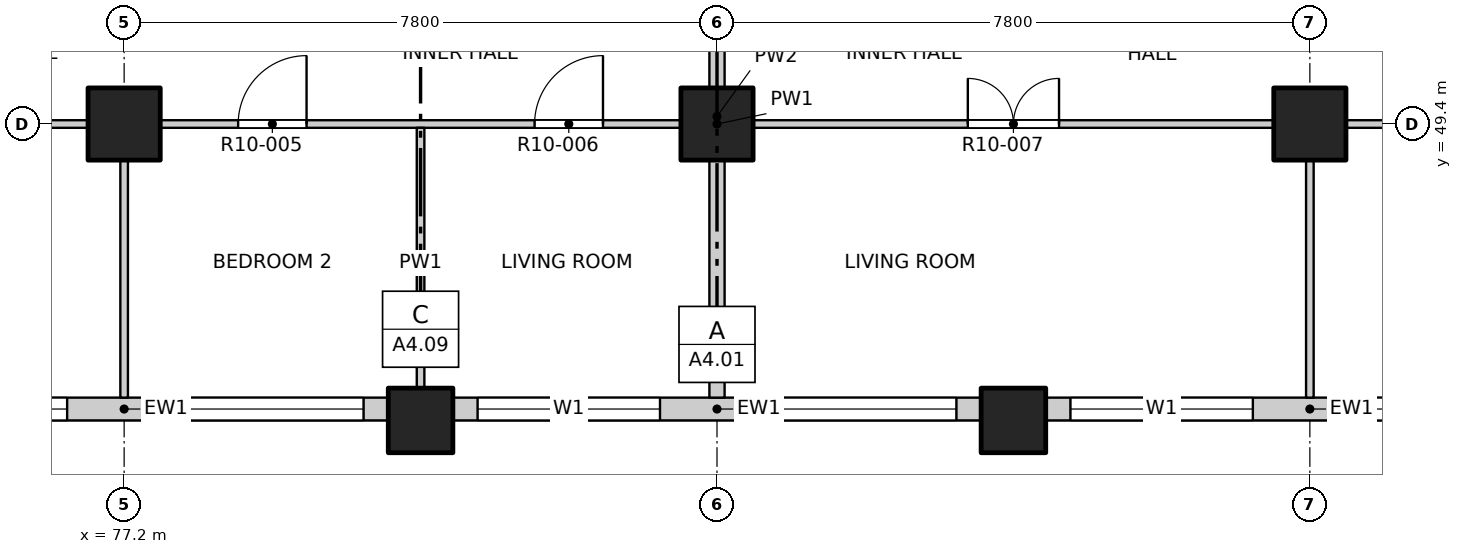
"""IFC4 building model, lengths in metres.
Left out: names, types, materials, properties, quantities, classifications, styles, units other than length and angle.
Written with IfcOpenShell. Run it as: python <this file> out.ifc"""

import sys

from ifc_helpers import new_model, si_unit, direction, frame, frame_2d, origin, origin_2d, place, context, subcontext, project, spatial, rectangle, extrude, element, fill, save


model = new_model("IFC4")
c1 = context("Model", 3, precision=1e-05, world=origin(), true_north=direction((0.0, 1.0)))
c2 = subcontext(c1, "Body", "Model", "MODEL_VIEW")
j1 = project(units=[si_unit("LENGTHUNIT", "METRE"), si_unit("PLANEANGLEUNIT", "RADIAN")], contexts=[c1])
p1 = place(None, origin())
s1 = spatial("IfcSite", under=j1, at=p1, CompositionType="ELEMENT")
p2 = place(p1, origin())
s2 = spatial("IfcBuilding", under=s1, at=p2, CompositionType="ELEMENT")
p3 = place(p2, frame((0.0, 0.0, 123.7)))
s3 = spatial("IfcBuildingStorey", under=s2, at=p3, CompositionType="ELEMENT", Elevation=123.7)
for number, where, z_axis, x_axis in (
    (1, (81.1, 45.5, -0.3), (0.0, 0.0, 1.0), (1.0, 0.0, 0.0)),
    (2, (88.9, 45.5, -0.3), (0.0, 0.0, 1.0), (1.0, 0.0, 0.0)),
):
    element("IfcColumn", number, at=place(p3, frame(where, z_axis=z_axis, x_axis=x_axis)), inside=s3, PredefinedType="COLUMN", context=c2, shape_type="SweptSolid", body=[
        extrude(rectangle(XDim=0.85, YDim=0.85, at=origin_2d()), origin(), (0.0, 0.0, 1.0), 3.45),
    ])
for number, where, z_axis, x_axis in (
    (3, (77.2, 49.4, -0.3), (0.0, 0.0, 1.0), (1.0, 0.0, 0.0)),
    (4, (85.0, 49.4, -0.3), (0.0, 0.0, 1.0), (1.0, 0.0, 0.0)),
    (5, (92.8, 49.4, -0.3), (0.0, 0.0, 1.0), (1.0, 0.0, 0.0)),
):
    element("IfcColumn", number, at=place(p3, frame(where, z_axis=z_axis, x_axis=x_axis)), inside=s3, PredefinedType="COLUMN", context=c2, shape_type="SweptSolid", body=[
        extrude(rectangle(XDim=0.95, YDim=0.95, at=origin_2d()), origin(), (0.0, 0.0, 1.0), 3.45),
    ])
p4 = place(p3, frame((73.725, 45.65, 0.0), z_axis=(0.0, 0.0, 1.0), x_axis=(1.0, 0.0, 0.0)))
e6 = element("IfcWall", 6, at=p4, inside=s3, PredefinedType="SOLIDWALL", context=c2, shape_type="SweptSolid", body=[
    extrude(rectangle(XDim=6.95, YDim=0.3, at=frame_2d((3.475, 0.0))), origin(), (0.0, 0.0, 1.0), 2.7),
])
p5 = place(p4, frame((0.325, 0.0, 0.9)))
e7 = element("IfcOpeningElement", 7, at=p5, cuts=e6, PredefinedType="OPENING", context=c2, shape_type="SweptSolid", body=[
    extrude(rectangle(XDim=2.4, YDim=1.8, at=frame_2d((1.2, 0.9))), frame((0.0, 0.16, 0.0), z_axis=(0.0, -1.0, 0.0), x_axis=(1.0, 0.0, 0.0)), (0.0, 0.0, 1.0), 0.32),
])
p6 = place(p4, frame((4.225, 0.0, 0.9)))
e8 = element("IfcOpeningElement", 8, at=p6, cuts=e6, PredefinedType="OPENING", context=c2, shape_type="SweptSolid", body=[
    extrude(rectangle(XDim=2.4, YDim=1.8, at=frame_2d((1.2, 0.9))), frame((0.0, 0.16, 0.0), z_axis=(0.0, -1.0, 0.0), x_axis=(1.0, 0.0, 0.0)), (0.0, 0.0, 1.0), 0.32),
])
p7 = place(p3, frame((81.525, 45.65, 0.0), z_axis=(0.0, 0.0, 1.0), x_axis=(1.0, 0.0, 0.0)))
e9 = element("IfcWall", 9, at=p7, inside=s3, PredefinedType="SOLIDWALL", context=c2, shape_type="SweptSolid", body=[
    extrude(rectangle(XDim=6.95, YDim=0.3, at=frame_2d((3.475, 0.0))), origin(), (0.0, 0.0, 1.0), 2.7),
])
p8 = place(p7, frame((0.325, 0.0, 0.9)))
e10 = element("IfcOpeningElement", 10, at=p8, cuts=e9, PredefinedType="OPENING", context=c2, shape_type="SweptSolid", body=[
    extrude(rectangle(XDim=2.4, YDim=1.8, at=frame_2d((1.2, 0.9))), frame((0.0, 0.16, 0.0), z_axis=(0.0, -1.0, 0.0), x_axis=(1.0, 0.0, 0.0)), (0.0, 0.0, 1.0), 0.32),
])
p9 = place(p7, frame((4.225, 0.0, 0.9)))
e11 = element("IfcOpeningElement", 11, at=p9, cuts=e9, PredefinedType="OPENING", context=c2, shape_type="SweptSolid", body=[
    extrude(rectangle(XDim=2.4, YDim=1.8, at=frame_2d((1.2, 0.9))), frame((0.0, 0.16, 0.0), z_axis=(0.0, -1.0, 0.0), x_axis=(1.0, 0.0, 0.0)), (0.0, 0.0, 1.0), 0.32),
])
p10 = place(p3, frame((89.325, 45.65, 0.0), z_axis=(0.0, 0.0, 1.0), x_axis=(1.0, 0.0, 0.0)))
e12 = element("IfcWall", 12, at=p10, inside=s3, PredefinedType="SOLIDWALL", context=c2, shape_type="SweptSolid", body=[
    extrude(rectangle(XDim=6.95, YDim=0.3, at=frame_2d((3.475, 0.0))), origin(), (0.0, 0.0, 1.0), 2.7),
])
p11 = place(p10, frame((0.325, 0.0, 0.9)))
e13 = element("IfcOpeningElement", 13, at=p11, cuts=e12, PredefinedType="OPENING", context=c2, shape_type="SweptSolid", body=[
    extrude(rectangle(XDim=2.4, YDim=1.8, at=frame_2d((1.2, 0.9))), frame((0.0, 0.16, 0.0), z_axis=(0.0, -1.0, 0.0), x_axis=(1.0, 0.0, 0.0)), (0.0, 0.0, 1.0), 0.32),
])
p12 = place(p10, frame((4.225, 0.0, 0.9)))
e14 = element("IfcOpeningElement", 14, at=p12, cuts=e12, PredefinedType="OPENING", context=c2, shape_type="SweptSolid", body=[
    extrude(rectangle(XDim=2.4, YDim=1.8, at=frame_2d((1.2, 0.9))), frame((0.0, 0.16, 0.0), z_axis=(0.0, -1.0, 0.0), x_axis=(1.0, 0.0, 0.0)), (0.0, 0.0, 1.0), 0.32),
])
p13 = place(p3, frame((65.8, 49.4, 0.0), z_axis=(0.0, 0.0, 1.0), x_axis=(1.0, 0.0, 0.0)))
e15 = element("IfcWall", 15, at=p13, inside=s3, PredefinedType="PARTITIONING", context=c2, shape_type="SweptSolid", body=[
    extrude(rectangle(XDim=38.4, YDim=0.1, at=frame_2d((19.2, 0.0))), origin(), (0.0, 0.0, 1.0), 3.15),
])
p14 = place(p13, frame((4.19, 0.0, 0.0)))
e16 = element("IfcOpeningElement", 16, at=p14, cuts=e15, PredefinedType="OPENING", context=c2, shape_type="SweptSolid", body=[
    extrude(rectangle(XDim=0.9, YDim=2.1, at=frame_2d((0.45, 1.05))), frame((0.0, 0.06, 0.0), z_axis=(0.0, -1.0, 0.0), x_axis=(1.0, 0.0, 0.0)), (0.0, 0.0, 1.0), 0.12),
])
p15 = place(p13, frame((9.0, 0.0, 0.0)))
e17 = element("IfcOpeningElement", 17, at=p15, cuts=e15, PredefinedType="OPENING", context=c2, shape_type="SweptSolid", body=[
    extrude(rectangle(XDim=0.9, YDim=2.1, at=frame_2d((0.45, 1.05))), frame((0.0, 0.06, 0.0), z_axis=(0.0, -1.0, 0.0), x_axis=(1.0, 0.0, 0.0)), (0.0, 0.0, 1.0), 0.12),
])
p16 = place(p13, frame((12.9, 0.0, 0.0)))
e18 = element("IfcOpeningElement", 18, at=p16, cuts=e15, PredefinedType="OPENING", context=c2, shape_type="SweptSolid", body=[
    extrude(rectangle(XDim=0.9, YDim=2.1, at=frame_2d((0.45, 1.05))), frame((0.0, 0.06, 0.0), z_axis=(0.0, -1.0, 0.0), x_axis=(1.0, 0.0, 0.0)), (0.0, 0.0, 1.0), 0.12),
])
p17 = place(p13, frame((16.8, 0.0, 0.0)))
e19 = element("IfcOpeningElement", 19, at=p17, cuts=e15, PredefinedType="OPENING", context=c2, shape_type="SweptSolid", body=[
    extrude(rectangle(XDim=0.9, YDim=2.1, at=frame_2d((0.45, 1.05))), frame((0.0, 0.06, 0.0), z_axis=(0.0, -1.0, 0.0), x_axis=(1.0, 0.0, 0.0)), (0.0, 0.0, 1.0), 0.12),
])
p18 = place(p13, frame((22.5, 0.0, 0.0)))
e20 = element("IfcOpeningElement", 20, at=p18, cuts=e15, PredefinedType="OPENING", context=c2, shape_type="SweptSolid", body=[
    extrude(rectangle(XDim=1.2, YDim=2.1, at=frame_2d((0.6, 1.05))), frame((0.0, 0.06, 0.0), z_axis=(0.0, -1.0, 0.0), x_axis=(1.0, 0.0, 0.0)), (0.0, 0.0, 1.0), 0.12),
])
p19 = place(p13, frame((28.5, 0.0, 0.0)))
e21 = element("IfcOpeningElement", 21, at=p19, cuts=e15, PredefinedType="OPENING", context=c2, shape_type="SweptSolid", body=[
    extrude(rectangle(XDim=0.9, YDim=2.1, at=frame_2d((0.45, 1.05))), frame((0.0, 0.06, 0.0), z_axis=(0.0, -1.0, 0.0), x_axis=(1.0, 0.0, 0.0)), (0.0, 0.0, 1.0), 0.12),
])
p20 = place(p13, frame((33.31, 0.0, 0.0)))
e22 = element("IfcOpeningElement", 22, at=p20, cuts=e15, PredefinedType="OPENING", context=c2, shape_type="SweptSolid", body=[
    extrude(rectangle(XDim=0.9, YDim=2.1, at=frame_2d((0.45, 1.05))), frame((0.0, 0.06, 0.0), z_axis=(0.0, -1.0, 0.0), x_axis=(1.0, 0.0, 0.0)), (0.0, 0.0, 1.0), 0.12),
])
for number, where, z_axis, x_axis in (
    (23, (77.2, 45.8, 0.0), (0.0, 0.0, 1.0), (0.0, 1.0, 0.0)),
    (24, (81.1, 45.8, 0.0), (0.0, 0.0, 1.0), (0.0, 1.0, 0.0)),
):
    element("IfcWall", number, at=place(p3, frame(where, z_axis=z_axis, x_axis=x_axis)), inside=s3, PredefinedType="PARTITIONING", context=c2, shape_type="SweptSolid", body=[
        extrude(rectangle(XDim=3.55, YDim=0.1, at=frame_2d((1.775, 0.0))), origin(), (0.0, 0.0, 1.0), 3.15),
    ])
p21 = place(p3, frame((85.0, 45.8, 0.0), z_axis=(0.0, 0.0, 1.0), x_axis=(0.0, 1.0, 0.0)))
e25 = element("IfcWall", 25, at=p21, inside=s3, PredefinedType="PARTITIONING", context=c2, shape_type="SweptSolid", body=[
    extrude(rectangle(XDim=7.4, YDim=0.2, at=frame_2d((3.7, 0.0))), origin(), (0.0, 0.0, 1.0), 3.15),
])
p22 = place(p3, frame((92.8, 45.8, 0.0), z_axis=(0.0, 0.0, 1.0), x_axis=(0.0, 1.0, 0.0)))
e26 = element("IfcWall", 26, at=p22, inside=s3, PredefinedType="PARTITIONING", context=c2, shape_type="SweptSolid", body=[
    extrude(rectangle(XDim=3.55, YDim=0.1, at=frame_2d((1.775, 0.0))), origin(), (0.0, 0.0, 1.0), 3.15),
])
p23 = place(p5, origin())
e27 = element("IfcWindow", 27, at=p23, inside=s3, PartitioningType="DOUBLE_PANEL_VERTICAL", PredefinedType="WINDOW", context=c2, shape_type="SweptSolid", body=[
    extrude(rectangle(XDim=2.4, YDim=1.8, at=frame_2d((1.2, 0.9))), frame((0.0, 0.03, 0.0), z_axis=(0.0, -1.0, 0.0), x_axis=(1.0, 0.0, 0.0)), (0.0, 0.0, 1.0), 0.06),
])
fill(e7, e27)
p24 = place(p6, origin())
e28 = element("IfcWindow", 28, at=p24, inside=s3, PartitioningType="DOUBLE_PANEL_VERTICAL", PredefinedType="WINDOW", context=c2, shape_type="SweptSolid", body=[
    extrude(rectangle(XDim=2.4, YDim=1.8, at=frame_2d((1.2, 0.9))), frame((0.0, 0.03, 0.0), z_axis=(0.0, -1.0, 0.0), x_axis=(1.0, 0.0, 0.0)), (0.0, 0.0, 1.0), 0.06),
])
fill(e8, e28)
p25 = place(p8, origin())
e29 = element("IfcWindow", 29, at=p25, inside=s3, PartitioningType="DOUBLE_PANEL_VERTICAL", PredefinedType="WINDOW", context=c2, shape_type="SweptSolid", body=[
    extrude(rectangle(XDim=2.4, YDim=1.8, at=frame_2d((1.2, 0.9))), frame((0.0, 0.03, 0.0), z_axis=(0.0, -1.0, 0.0), x_axis=(1.0, 0.0, 0.0)), (0.0, 0.0, 1.0), 0.06),
])
fill(e10, e29)
p26 = place(p9, origin())
e30 = element("IfcWindow", 30, at=p26, inside=s3, PartitioningType="DOUBLE_PANEL_VERTICAL", PredefinedType="WINDOW", context=c2, shape_type="SweptSolid", body=[
    extrude(rectangle(XDim=2.4, YDim=1.8, at=frame_2d((1.2, 0.9))), frame((0.0, 0.03, 0.0), z_axis=(0.0, -1.0, 0.0), x_axis=(1.0, 0.0, 0.0)), (0.0, 0.0, 1.0), 0.06),
])
fill(e11, e30)
p27 = place(p11, origin())
e31 = element("IfcWindow", 31, at=p27, inside=s3, PartitioningType="DOUBLE_PANEL_VERTICAL", PredefinedType="WINDOW", context=c2, shape_type="SweptSolid", body=[
    extrude(rectangle(XDim=2.4, YDim=1.8, at=frame_2d((1.2, 0.9))), frame((0.0, 0.03, 0.0), z_axis=(0.0, -1.0, 0.0), x_axis=(1.0, 0.0, 0.0)), (0.0, 0.0, 1.0), 0.06),
])
fill(e13, e31)
p28 = place(p12, origin())
e32 = element("IfcWindow", 32, at=p28, inside=s3, PartitioningType="DOUBLE_PANEL_VERTICAL", PredefinedType="WINDOW", context=c2, shape_type="SweptSolid", body=[
    extrude(rectangle(XDim=2.4, YDim=1.8, at=frame_2d((1.2, 0.9))), frame((0.0, 0.03, 0.0), z_axis=(0.0, -1.0, 0.0), x_axis=(1.0, 0.0, 0.0)), (0.0, 0.0, 1.0), 0.06),
])
fill(e14, e32)
p29 = place(p16, origin())
e33 = element("IfcDoor", 33, at=p29, inside=s3, OperationType="SINGLE_SWING_RIGHT", PredefinedType="DOOR", context=c2, shape_type="SweptSolid", body=[
    extrude(rectangle(XDim=0.9, YDim=2.1, at=frame_2d((0.45, 1.05))), frame((0.0, 0.025, 0.0), z_axis=(0.0, -1.0, 0.0), x_axis=(1.0, 0.0, 0.0)), (0.0, 0.0, 1.0), 0.05),
])
fill(e18, e33)
p30 = place(p17, origin())
e34 = element("IfcDoor", 34, at=p30, inside=s3, OperationType="SINGLE_SWING_RIGHT", PredefinedType="DOOR", context=c2, shape_type="SweptSolid", body=[
    extrude(rectangle(XDim=0.9, YDim=2.1, at=frame_2d((0.45, 1.05))), frame((0.0, 0.025, 0.0), z_axis=(0.0, -1.0, 0.0), x_axis=(1.0, 0.0, 0.0)), (0.0, 0.0, 1.0), 0.05),
])
fill(e19, e34)
p31 = place(p18, origin())
e35 = element("IfcDoor", 35, at=p31, inside=s3, OperationType="DOUBLE_DOOR_SINGLE_SWING", PredefinedType="DOOR", context=c2, shape_type="SweptSolid", body=[
    extrude(rectangle(XDim=1.2, YDim=2.1, at=frame_2d((0.6, 1.05))), frame((0.0, 0.025, 0.0), z_axis=(0.0, -1.0, 0.0), x_axis=(1.0, 0.0, 0.0)), (0.0, 0.0, 1.0), 0.05),
])
fill(e20, e35)
save(model, sys.argv[1])
